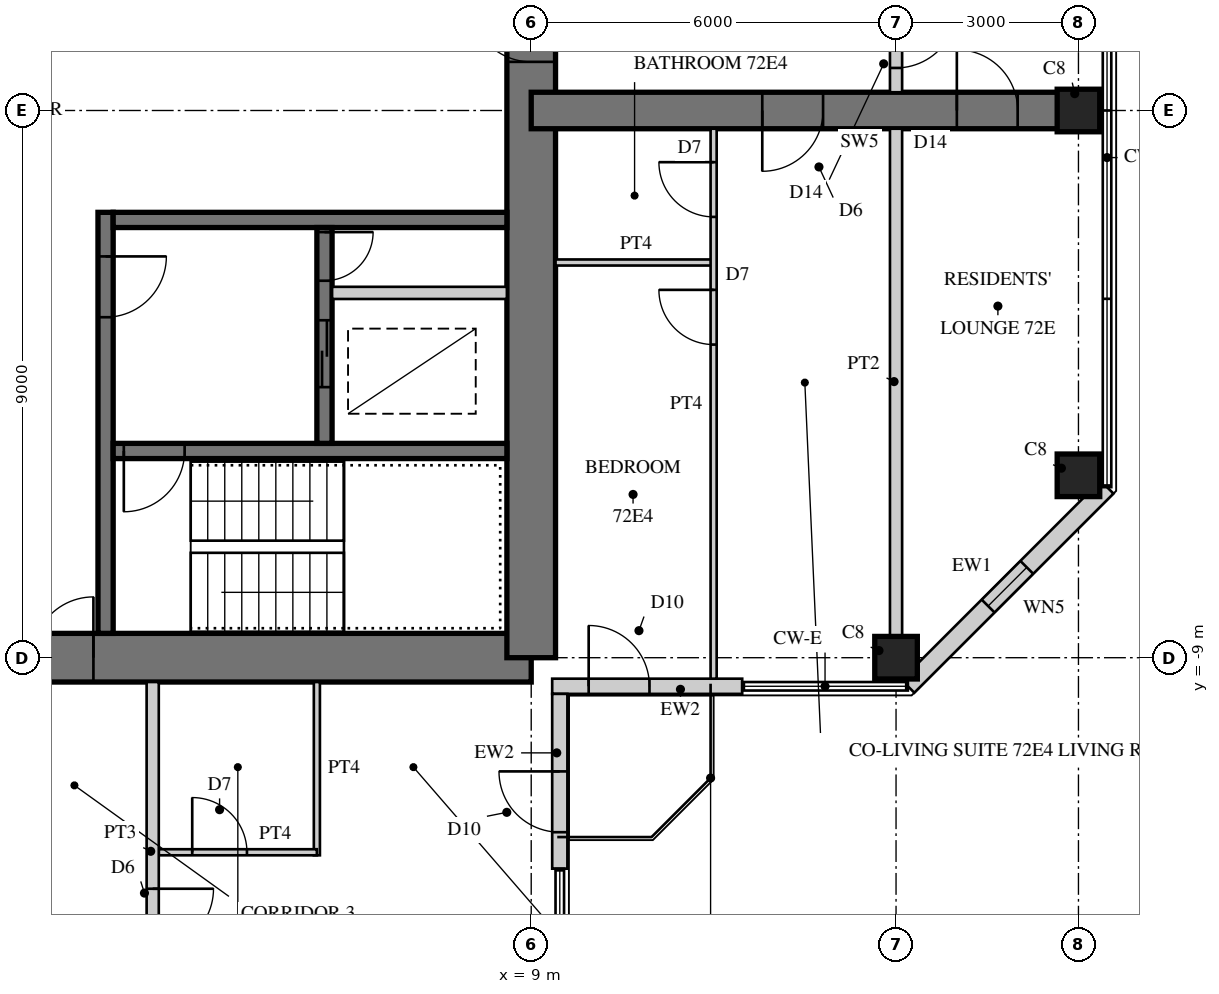
"""IFC4 building model, lengths in metres.
Left out: names, types, materials, properties, quantities, classifications, styles, units other than length and angle.
Written with IfcOpenShell. Run it as: python <this file> out.ifc"""

import sys

from ifc_helpers import new_model, si_unit, direction, frame, frame_2d, origin, origin_2d, place, context, subcontext, project, spatial, rectangle, hollow_rectangle, extrude, element, fill, save


model = new_model("IFC4")
c1 = context("Model", 3, precision=1e-05, world=origin(), true_north=direction((0.0, 1.0)))
c2 = subcontext(c1, "Body", "Model", "MODEL_VIEW")
j1 = project(units=[si_unit("LENGTHUNIT", "METRE"), si_unit("PLANEANGLEUNIT", "RADIAN")], contexts=[c1])
p1 = place(None, origin())
s1 = spatial("IfcSite", under=j1, at=p1, CompositionType="ELEMENT")
p2 = place(p1, origin())
s2 = spatial("IfcBuilding", under=s1, at=p2, CompositionType="ELEMENT")
p3 = place(p2, frame((0.0, 0.0, 278.1)))
s3 = spatial("IfcBuildingStorey", under=s2, at=p3, CompositionType="ELEMENT", Elevation=278.1)
p4 = place(p3, frame((-9.0, -9.0, 0.0), z_axis=(0.0, 0.0, 1.0), x_axis=(1.0, 0.0, 0.0)))
e1 = element("IfcWall", 1, at=p4, inside=s3, PredefinedType="SHEAR", context=c2, shape_type="SweptSolid", body=[
    extrude(rectangle(XDim=18.0, YDim=0.8, at=frame_2d((9.0, 0.0))), origin(), (0.0, 0.0, 1.0), 3.4),
])
p5 = place(p4, frame((9.8, 0.0, 0.0)))
e2 = element("IfcOpeningElement", 2, at=p5, cuts=e1, PredefinedType="OPENING", context=c2, shape_type="SweptSolid", body=[
    extrude(rectangle(XDim=1.0, YDim=2.4, at=frame_2d((0.5, 1.2))), frame((0.0, 0.41, 0.0), z_axis=(0.0, -1.0, 0.0), x_axis=(1.0, 0.0, 0.0)), (0.0, 0.0, 1.0), 0.82),
])
p6 = place(p3, frame((9.0, -9.0, 0.0), z_axis=(0.0, 0.0, 1.0), x_axis=(0.0, 1.0, 0.0)))
e3 = element("IfcWall", 3, at=p6, inside=s3, PredefinedType="SHEAR", context=c2, shape_type="SweptSolid", body=[
    extrude(rectangle(XDim=18.0, YDim=0.8, at=frame_2d((9.0, 0.0))), origin(), (0.0, 0.0, 1.0), 3.4),
])
p7 = place(p6, frame((9.8, 0.0, 0.0)))
e4 = element("IfcOpeningElement", 4, at=p7, cuts=e3, PredefinedType="OPENING", context=c2, shape_type="SweptSolid", body=[
    extrude(rectangle(XDim=1.0, YDim=2.4, at=frame_2d((0.5, 1.2))), frame((0.0, 0.41, 0.0), z_axis=(0.0, -1.0, 0.0), x_axis=(1.0, 0.0, 0.0)), (0.0, 0.0, 1.0), 0.82),
])
p8 = place(p3, frame((2.0, -1.675, 0.0), z_axis=(0.0, 0.0, 1.0), x_axis=(0.0, -1.0, 0.0)))
e5 = element("IfcWall", 5, at=p8, inside=s3, PredefinedType="SHEAR", context=c2, shape_type="SweptSolid", body=[
    extrude(rectangle(XDim=6.925, YDim=0.25, at=frame_2d((3.462, 0.0))), origin(), (0.0, 0.0, 1.0), 3.4),
])
p9 = place(p8, frame((0.725, 0.0, 0.0)))
e6 = element("IfcOpeningElement", 6, at=p9, cuts=e5, PredefinedType="OPENING", context=c2, shape_type="SweptSolid", body=[
    extrude(rectangle(XDim=1.0, YDim=2.1, at=frame_2d((0.5, 1.05))), frame((0.0, 0.135, 0.0), z_axis=(0.0, -1.0, 0.0), x_axis=(1.0, 0.0, 0.0)), (0.0, 0.0, 1.0), 0.27),
])
p10 = place(p3, frame((2.125, -1.8, 0.0), z_axis=(0.0, 0.0, 1.0), x_axis=(1.0, 0.0, 0.0)))
e7 = element("IfcWall", 7, at=p10, inside=s3, PredefinedType="SHEAR", context=c2, shape_type="SweptSolid", body=[
    extrude(rectangle(XDim=6.475, YDim=0.25, at=frame_2d((3.238, 0.0))), origin(), (0.0, 0.0, 1.0), 3.4),
])
p11 = place(p3, frame((2.125, -5.6, 0.0), z_axis=(0.0, 0.0, 1.0), x_axis=(1.0, 0.0, 0.0)))
e8 = element("IfcWall", 8, at=p11, inside=s3, PredefinedType="SHEAR", context=c2, shape_type="SweptSolid", body=[
    extrude(rectangle(XDim=6.475, YDim=0.25, at=frame_2d((3.238, 0.0))), origin(), (0.0, 0.0, 1.0), 3.4),
])
p12 = place(p11, frame((0.175, 0.0, 0.0)))
e9 = element("IfcOpeningElement", 9, at=p12, cuts=e8, PredefinedType="OPENING", context=c2, shape_type="SweptSolid", body=[
    extrude(rectangle(XDim=1.0, YDim=2.1, at=frame_2d((0.5, 1.05))), frame((0.0, 0.135, 0.0), z_axis=(0.0, -1.0, 0.0), x_axis=(1.0, 0.0, 0.0)), (0.0, 0.0, 1.0), 0.27),
])
p13 = place(p3, frame((5.6, -1.925, 0.0), z_axis=(0.0, 0.0, 1.0), x_axis=(0.0, -1.0, 0.0)))
e10 = element("IfcWall", 10, at=p13, inside=s3, PredefinedType="SHEAR", context=c2, shape_type="SweptSolid", body=[
    extrude(rectangle(XDim=3.55, YDim=0.25, at=frame_2d((1.775, 0.0))), origin(), (0.0, 0.0, 1.0), 3.4),
])
p14 = place(p13, frame((1.525, 0.0, 0.0)))
e11 = element("IfcOpeningElement", 11, at=p14, cuts=e10, PredefinedType="OPENING", context=c2, shape_type="SweptSolid", body=[
    extrude(rectangle(XDim=1.1, YDim=2.2, at=frame_2d((0.55, 1.1))), frame((0.0, 0.135, 0.0), z_axis=(0.0, -1.0, 0.0), x_axis=(1.0, 0.0, 0.0)), (0.0, 0.0, 1.0), 0.27),
])
p15 = place(p13, frame((0.075, 0.0, 0.0)))
e12 = element("IfcOpeningElement", 12, at=p15, cuts=e10, PredefinedType="OPENING", context=c2, shape_type="SweptSolid", body=[
    extrude(rectangle(XDim=0.8, YDim=2.1, at=frame_2d((0.4, 1.05))), frame((0.0, 0.135, 0.0), z_axis=(0.0, -1.0, 0.0), x_axis=(1.0, 0.0, 0.0)), (0.0, 0.0, 1.0), 0.27),
])
p16 = place(p3, frame((5.725, -3.0, 0.0), z_axis=(0.0, 0.0, 1.0), x_axis=(1.0, 0.0, 0.0)))
e13 = element("IfcWall", 13, at=p16, inside=s3, PredefinedType="PARTITIONING", context=c2, shape_type="SweptSolid", body=[
    extrude(rectangle(XDim=2.875, YDim=0.2, at=frame_2d((1.438, 0.0))), origin(), (0.0, 0.0, 1.0), 3.4),
])
p17 = place(p3, frame((9.0, 0.0, 0.0), z_axis=(0.0, 0.0, 1.0), x_axis=(1.0, 0.0, 0.0)))
e14 = element("IfcWall", 14, at=p17, inside=s3, PredefinedType="SHEAR", context=c2, shape_type="SweptSolid", body=[
    extrude(rectangle(XDim=9.0, YDim=0.6, at=frame_2d((4.5, 0.0))), origin(), (0.0, 0.0, 1.0), 3.4),
])
p18 = place(p17, frame((3.8, 0.0, 0.0)))
e15 = element("IfcOpeningElement", 15, at=p18, cuts=e14, PredefinedType="OPENING", context=c2, shape_type="SweptSolid", body=[
    extrude(rectangle(XDim=1.0, YDim=2.15, at=frame_2d((0.5, 1.075))), frame((0.0, 0.31, 0.0), z_axis=(0.0, -1.0, 0.0), x_axis=(1.0, 0.0, 0.0)), (0.0, 0.0, 1.0), 0.62),
])
p19 = place(p17, frame((7.0, 0.0, 0.0)))
e16 = element("IfcOpeningElement", 16, at=p19, cuts=e14, PredefinedType="OPENING", context=c2, shape_type="SweptSolid", body=[
    extrude(rectangle(XDim=1.0, YDim=2.2, at=frame_2d((0.5, 1.1))), frame((0.0, 0.31, 0.0), z_axis=(0.0, -1.0, 0.0), x_axis=(1.0, 0.0, 0.0)), (0.0, 0.0, 1.0), 0.62),
])
for number, where, z_axis, x_axis in (
    (17, (15.0, -9.0, 0.0), (0.0, 0.0, 1.0), (1.0, 0.0, 0.0)),
    (18, (18.0, -6.0, 0.0), (0.0, 0.0, 1.0), (1.0, 0.0, 0.0)),
    (19, (18.0, 0.0, 0.0), (0.0, 0.0, 1.0), (1.0, 0.0, 0.0)),
):
    element("IfcColumn", number, at=place(p3, frame(where, z_axis=z_axis, x_axis=x_axis)), inside=s3, PredefinedType="COLUMN", context=c2, shape_type="SweptSolid", body=[
        extrude(rectangle(XDim=0.7, YDim=0.7, at=origin_2d()), origin(), (0.0, 0.0, 1.0), 3.4),
    ])
p20 = place(p3, frame((9.345, -9.47, 0.0), z_axis=(0.0, 0.0, 1.0), x_axis=(1.0, 0.0, 0.0)))
e20 = element("IfcWall", 20, at=p20, inside=s3, PredefinedType="SOLIDWALL", context=c2, shape_type="SweptSolid", body=[
    extrude(rectangle(XDim=3.125, YDim=0.25, at=frame_2d((1.562, 0.0))), origin(), (0.0, 0.0, 1.0), 3.22),
])
p21 = place(p20, frame((0.6, 0.0, 0.0)))
e21 = element("IfcOpeningElement", 21, at=p21, cuts=e20, PredefinedType="OPENING", context=c2, shape_type="SweptSolid", body=[
    extrude(rectangle(XDim=1.0, YDim=2.2, at=frame_2d((0.5, 1.1))), frame((0.0, 0.135, 0.0), z_axis=(0.0, -1.0, 0.0), x_axis=(1.0, 0.0, 0.0)), (0.0, 0.0, 1.0), 0.27),
])
p22 = place(p3, frame((15.195, -9.47, 0.0), z_axis=(0.0, 0.0, 1.0), x_axis=(0.707106781187, 0.707106781187, 0.0)))
e22 = element("IfcWall", 22, at=p22, inside=s3, PredefinedType="SOLIDWALL", context=c2, shape_type="SweptSolid", body=[
    extrude(rectangle(XDim=4.632, YDim=0.3, at=frame_2d((2.316, 0.0))), origin(), (0.0, 0.0, 1.0), 3.22),
])
p23 = place(p22, frame((1.866, 0.0, 0.3)))
e23 = element("IfcOpeningElement", 23, at=p23, cuts=e22, PredefinedType="OPENING", context=c2, shape_type="SweptSolid", body=[
    extrude(rectangle(XDim=0.9, YDim=2.4, at=frame_2d((0.45, 1.2))), frame((0.0, 0.16, 0.0), z_axis=(0.0, -1.0, 0.0), x_axis=(1.0, 0.0, 0.0)), (0.0, 0.0, 1.0), 0.32),
])
p24 = place(p3, frame((9.47, -12.47, 0.0), z_axis=(0.0, 0.0, 1.0), x_axis=(0.0, 1.0, 0.0)))
e24 = element("IfcWall", 24, at=p24, inside=s3, PredefinedType="SOLIDWALL", context=c2, shape_type="SweptSolid", body=[
    extrude(rectangle(XDim=2.875, YDim=0.25, at=frame_2d((1.438, 0.0))), origin(), (0.0, 0.0, 1.0), 3.22),
])
p25 = place(p24, frame((0.6, 0.0, 0.0)))
e25 = element("IfcOpeningElement", 25, at=p25, cuts=e24, PredefinedType="OPENING", context=c2, shape_type="SweptSolid", body=[
    extrude(rectangle(XDim=1.0, YDim=2.2, at=frame_2d((0.5, 1.1))), frame((0.0, 0.135, 0.0), z_axis=(0.0, -1.0, 0.0), x_axis=(1.0, 0.0, 0.0)), (0.0, 0.0, 1.0), 0.27),
])
p26 = place(p3, frame((9.4, -2.5, 0.0), z_axis=(0.0, 0.0, 1.0), x_axis=(1.0, 0.0, 0.0)))
e26 = element("IfcWall", 26, at=p26, inside=s3, PredefinedType="PARTITIONING", context=c2, shape_type="SweptSolid", body=[
    extrude(rectangle(XDim=2.65, YDim=0.1, at=frame_2d((1.325, 0.0))), origin(), (0.0, 0.0, 1.0), 3.22),
])
p27 = place(p3, frame((12.0, -9.345, 0.0), z_axis=(0.0, 0.0, 1.0), x_axis=(0.0, 1.0, 0.0)))
e27 = element("IfcWall", 27, at=p27, inside=s3, PredefinedType="PARTITIONING", context=c2, shape_type="SweptSolid", body=[
    extrude(rectangle(XDim=9.045, YDim=0.1, at=frame_2d((4.522, 0.0))), origin(), (0.0, 0.0, 1.0), 3.22),
])
p28 = place(p27, frame((5.495, 0.0, 0.0)))
e28 = element("IfcOpeningElement", 28, at=p28, cuts=e27, PredefinedType="OPENING", context=c2, shape_type="SweptSolid", body=[
    extrude(rectangle(XDim=0.9, YDim=2.1, at=frame_2d((0.45, 1.05))), frame((0.0, 0.06, 0.0), z_axis=(0.0, -1.0, 0.0), x_axis=(1.0, 0.0, 0.0)), (0.0, 0.0, 1.0), 0.12),
])
p29 = place(p27, frame((7.595, 0.0, 0.0)))
e29 = element("IfcOpeningElement", 29, at=p29, cuts=e27, PredefinedType="OPENING", context=c2, shape_type="SweptSolid", body=[
    extrude(rectangle(XDim=0.9, YDim=2.1, at=frame_2d((0.45, 1.05))), frame((0.0, 0.06, 0.0), z_axis=(0.0, -1.0, 0.0), x_axis=(1.0, 0.0, 0.0)), (0.0, 0.0, 1.0), 0.12),
])
p30 = place(p3, frame((15.0, -8.65, 0.0), z_axis=(0.0, 0.0, 1.0), x_axis=(0.0, 1.0, 0.0)))
e30 = element("IfcWall", 30, at=p30, inside=s3, PredefinedType="SOLIDWALL", context=c2, shape_type="SweptSolid", body=[
    extrude(rectangle(XDim=8.35, YDim=0.2, at=frame_2d((4.175, 0.0))), origin(), (0.0, 0.0, 1.0), 2.52),
])
p31 = place(p3, frame((15.0, 0.3, 0.0), z_axis=(0.0, 0.0, 1.0), x_axis=(0.0, 1.0, 0.0)))
e31 = element("IfcWall", 31, at=p31, inside=s3, PredefinedType="SOLIDWALL", context=c2, shape_type="SweptSolid", body=[
    extrude(rectangle(XDim=8.35, YDim=0.2, at=frame_2d((4.175, 0.0))), origin(), (0.0, 0.0, 1.0), 2.52),
])
p32 = place(p31, frame((0.4, 0.0, 0.0)))
e32 = element("IfcOpeningElement", 32, at=p32, cuts=e31, PredefinedType="OPENING", context=c2, shape_type="SweptSolid", body=[
    extrude(rectangle(XDim=1.0, YDim=2.2, at=frame_2d((0.5, 1.1))), frame((0.0, 0.11, 0.0), z_axis=(0.0, -1.0, 0.0), x_axis=(1.0, 0.0, 0.0)), (0.0, 0.0, 1.0), 0.22),
])
p33 = place(p3, frame((5.475, -9.4, 0.0), z_axis=(0.0, 0.0, 1.0), x_axis=(0.0, -1.0, 0.0)))
e33 = element("IfcWall", 33, at=p33, inside=s3, PredefinedType="PARTITIONING", context=c2, shape_type="SweptSolid", body=[
    extrude(rectangle(XDim=2.85, YDim=0.1, at=frame_2d((1.425, 0.0))), origin(), (0.0, 0.0, 1.0), 3.22),
])
p34 = place(p3, frame((2.875, -12.2, 0.0), z_axis=(0.0, 0.0, 1.0), x_axis=(1.0, 0.0, 0.0)))
e34 = element("IfcWall", 34, at=p34, inside=s3, PredefinedType="PARTITIONING", context=c2, shape_type="SweptSolid", body=[
    extrude(rectangle(XDim=2.6, YDim=0.1, at=frame_2d((1.3, 0.0))), origin(), (0.0, 0.0, 1.0), 3.22),
])
p35 = place(p34, frame((0.55, 0.0, 0.0)))
e35 = element("IfcOpeningElement", 35, at=p35, cuts=e34, PredefinedType="OPENING", context=c2, shape_type="SweptSolid", body=[
    extrude(rectangle(XDim=0.9, YDim=2.1, at=frame_2d((0.45, 1.05))), frame((0.0, 0.06, 0.0), z_axis=(0.0, -1.0, 0.0), x_axis=(1.0, 0.0, 0.0)), (0.0, 0.0, 1.0), 0.12),
])
p36 = place(p3, frame((2.775, -9.4, 0.0), z_axis=(0.0, 0.0, 1.0), x_axis=(0.0, -1.0, 0.0)))
e36 = element("IfcWall", 36, at=p36, inside=s3, PredefinedType="SOLIDWALL", context=c2, shape_type="SweptSolid", body=[
    extrude(rectangle(XDim=5.6, YDim=0.2, at=frame_2d((2.8, 0.0))), origin(), (0.0, 0.0, 1.0), 3.22),
])
p37 = place(p36, frame((3.4, 0.0, 0.0)))
e37 = element("IfcOpeningElement", 37, at=p37, cuts=e36, PredefinedType="OPENING", context=c2, shape_type="SweptSolid", body=[
    extrude(rectangle(XDim=1.0, YDim=2.15, at=frame_2d((0.5, 1.075))), frame((0.0, 0.11, 0.0), z_axis=(0.0, -1.0, 0.0), x_axis=(1.0, 0.0, 0.0)), (0.0, 0.0, 1.0), 0.22),
])
p38 = place(p21, origin())
e38 = element("IfcDoor", 38, at=p38, inside=s3, OperationType="SINGLE_SWING_LEFT", PredefinedType="DOOR", context=c2, shape_type="SweptSolid", body=[
    extrude(hollow_rectangle(XDim=1.0, YDim=2.2, WallThickness=0.06, at=frame_2d((0.5, 1.1))), frame((0.0, 0.025, 0.0), z_axis=(0.0, -1.0, 0.0), x_axis=(1.0, 0.0, 0.0)), (0.0, 0.0, 1.0), 0.05),
    extrude(rectangle(XDim=0.879, YDim=2.079, at=frame_2d((0.5, 1.1))), frame((0.0, 0.025, 0.0), z_axis=(0.0, -1.0, 0.0), x_axis=(1.0, 0.0, 0.0)), (0.0, 0.0, 1.0), 0.05),
])
fill(e21, e38)
p39 = place(p23, origin())
e39 = element("IfcWindow", 39, at=p39, inside=s3, PartitioningType="SINGLE_PANEL", PredefinedType="WINDOW", context=c2, shape_type="SweptSolid", body=[
    extrude(hollow_rectangle(XDim=0.9, YDim=2.4, WallThickness=0.06, at=frame_2d((0.45, 1.2))), frame((0.0, 0.03, 0.0), z_axis=(0.0, -1.0, 0.0), x_axis=(1.0, 0.0, 0.0)), (0.0, 0.0, 1.0), 0.06),
    extrude(rectangle(XDim=0.779, YDim=2.279, at=frame_2d((0.45, 1.2))), frame((0.0, 0.03, 0.0), z_axis=(0.0, -1.0, 0.0), x_axis=(1.0, 0.0, 0.0)), (0.0, 0.0, 1.0), 0.06),
])
fill(e23, e39)
p40 = place(p25, origin())
e40 = element("IfcDoor", 40, at=p40, inside=s3, OperationType="SINGLE_SWING_RIGHT", PredefinedType="DOOR", context=c2, shape_type="SweptSolid", body=[
    extrude(hollow_rectangle(XDim=1.0, YDim=2.2, WallThickness=0.06, at=frame_2d((0.5, 1.1))), frame((0.0, 0.025, 0.0), z_axis=(0.0, -1.0, 0.0), x_axis=(1.0, 0.0, 0.0)), (0.0, 0.0, 1.0), 0.05),
    extrude(rectangle(XDim=0.879, YDim=2.079, at=frame_2d((0.5, 1.1))), frame((0.0, 0.025, 0.0), z_axis=(0.0, -1.0, 0.0), x_axis=(1.0, 0.0, 0.0)), (0.0, 0.0, 1.0), 0.05),
])
fill(e25, e40)
p41 = place(p28, origin())
e41 = element("IfcDoor", 41, at=p41, inside=s3, OperationType="SINGLE_SWING_RIGHT", PredefinedType="DOOR", context=c2, shape_type="SweptSolid", body=[
    extrude(rectangle(XDim=0.9, YDim=2.1, at=frame_2d((0.45, 1.05))), frame((0.0, 0.025, 0.0), z_axis=(0.0, -1.0, 0.0), x_axis=(1.0, 0.0, 0.0)), (0.0, 0.0, 1.0), 0.05),
])
fill(e28, e41)
p42 = place(p29, origin())
e42 = element("IfcDoor", 42, at=p42, inside=s3, OperationType="SINGLE_SWING_RIGHT", PredefinedType="DOOR", context=c2, shape_type="SweptSolid", body=[
    extrude(rectangle(XDim=0.9, YDim=2.1, at=frame_2d((0.45, 1.05))), frame((0.0, 0.025, 0.0), z_axis=(0.0, -1.0, 0.0), x_axis=(1.0, 0.0, 0.0)), (0.0, 0.0, 1.0), 0.05),
])
fill(e29, e42)
p43 = place(p32, frame((1.0, 0.0, 0.0), z_axis=(0.0, 0.0, 1.0), x_axis=(-1.0, 0.0, 0.0)))
e43 = element("IfcDoor", 43, at=p43, inside=s3, OperationType="SINGLE_SWING_LEFT", PredefinedType="DOOR", context=c2, shape_type="SweptSolid", body=[
    extrude(rectangle(XDim=1.0, YDim=2.2, at=frame_2d((0.5, 1.1))), frame((0.0, 0.025, 0.0), z_axis=(0.0, -1.0, 0.0), x_axis=(1.0, 0.0, 0.0)), (0.0, 0.0, 1.0), 0.05),
])
fill(e32, e43)
p44 = place(p35, origin())
e44 = element("IfcDoor", 44, at=p44, inside=s3, OperationType="SINGLE_SWING_LEFT", PredefinedType="DOOR", context=c2, shape_type="SweptSolid", body=[
    extrude(rectangle(XDim=0.9, YDim=2.1, at=frame_2d((0.45, 1.05))), frame((0.0, 0.025, 0.0), z_axis=(0.0, -1.0, 0.0), x_axis=(1.0, 0.0, 0.0)), (0.0, 0.0, 1.0), 0.05),
])
fill(e35, e44)
p45 = place(p37, origin())
e45 = element("IfcDoor", 45, at=p45, inside=s3, OperationType="SINGLE_SWING_LEFT", PredefinedType="DOOR", context=c2, shape_type="SweptSolid", body=[
    extrude(rectangle(XDim=1.0, YDim=2.15, at=frame_2d((0.5, 1.075))), frame((0.0, 0.025, 0.0), z_axis=(0.0, -1.0, 0.0), x_axis=(1.0, 0.0, 0.0)), (0.0, 0.0, 1.0), 0.05),
])
fill(e37, e45)
p46 = place(p18, frame((1.0, 0.0, 0.0), z_axis=(0.0, 0.0, 1.0), x_axis=(-1.0, 0.0, 0.0)))
e46 = element("IfcDoor", 46, at=p46, inside=s3, OperationType="SINGLE_SWING_RIGHT", PredefinedType="DOOR", context=c2, shape_type="SweptSolid", body=[
    extrude(rectangle(XDim=1.0, YDim=2.15, at=frame_2d((0.5, 1.075))), frame((0.0, 0.025, 0.0), z_axis=(0.0, -1.0, 0.0), x_axis=(1.0, 0.0, 0.0)), (0.0, 0.0, 1.0), 0.05),
])
fill(e15, e46)
p47 = place(p19, origin())
e47 = element("IfcDoor", 47, at=p47, inside=s3, OperationType="SINGLE_SWING_LEFT", PredefinedType="DOOR", context=c2, shape_type="SweptSolid", body=[
    extrude(rectangle(XDim=1.0, YDim=2.2, at=frame_2d((0.5, 1.1))), frame((0.0, 0.025, 0.0), z_axis=(0.0, -1.0, 0.0), x_axis=(1.0, 0.0, 0.0)), (0.0, 0.0, 1.0), 0.05),
])
fill(e16, e47)
p48 = place(p5, origin())
e48 = element("IfcDoor", 48, at=p48, inside=s3, OperationType="SINGLE_SWING_RIGHT", PredefinedType="DOOR", context=c2, shape_type="SweptSolid", body=[
    extrude(rectangle(XDim=1.0, YDim=2.4, at=frame_2d((0.5, 1.2))), frame((0.0, 0.055, 0.0), z_axis=(0.0, -1.0, 0.0), x_axis=(1.0, 0.0, 0.0)), (0.0, 0.0, 1.0), 0.05),
])
fill(e2, e48)
p49 = place(p7, origin())
e49 = element("IfcDoor", 49, at=p49, inside=s3, OperationType="SINGLE_SWING_RIGHT", PredefinedType="DOOR", context=c2, shape_type="SweptSolid", body=[
    extrude(rectangle(XDim=1.0, YDim=2.4, at=frame_2d((0.5, 1.2))), frame((0.0, 0.055, 0.0), z_axis=(0.0, -1.0, 0.0), x_axis=(1.0, 0.0, 0.0)), (0.0, 0.0, 1.0), 0.05),
])
fill(e4, e49)
p50 = place(p9, origin())
e50 = element("IfcDoor", 50, at=p50, inside=s3, OperationType="SINGLE_SWING_LEFT", PredefinedType="DOOR", context=c2, shape_type="SweptSolid", body=[
    extrude(rectangle(XDim=1.0, YDim=2.1, at=frame_2d((0.5, 1.05))), frame((0.0, 0.025, 0.0), z_axis=(0.0, -1.0, 0.0), x_axis=(1.0, 0.0, 0.0)), (0.0, 0.0, 1.0), 0.05),
])
fill(e6, e50)
p51 = place(p12, frame((1.0, 0.0, 0.0), z_axis=(0.0, 0.0, 1.0), x_axis=(-1.0, 0.0, 0.0)))
e51 = element("IfcDoor", 51, at=p51, inside=s3, OperationType="SINGLE_SWING_RIGHT", PredefinedType="DOOR", context=c2, shape_type="SweptSolid", body=[
    extrude(rectangle(XDim=1.0, YDim=2.1, at=frame_2d((0.5, 1.05))), frame((0.0, 0.025, 0.0), z_axis=(0.0, -1.0, 0.0), x_axis=(1.0, 0.0, 0.0)), (0.0, 0.0, 1.0), 0.05),
])
fill(e9, e51)
p52 = place(p14, origin())
e52 = element("IfcDoor", 52, at=p52, inside=s3, OperationType="DOUBLE_DOOR_SLIDING", PredefinedType="DOOR", context=c2, shape_type="SweptSolid", body=[
    extrude(rectangle(XDim=1.1, YDim=2.2, at=frame_2d((0.55, 1.1))), frame((0.0, 0.025, 0.0), z_axis=(0.0, -1.0, 0.0), x_axis=(1.0, 0.0, 0.0)), (0.0, 0.0, 1.0), 0.05),
])
fill(e11, e52)
p53 = place(p15, origin())
e53 = element("IfcDoor", 53, at=p53, inside=s3, OperationType="SINGLE_SWING_LEFT", PredefinedType="DOOR", context=c2, shape_type="SweptSolid", body=[
    extrude(rectangle(XDim=0.8, YDim=2.1, at=frame_2d((0.4, 1.05))), frame((0.0, 0.025, 0.0), z_axis=(0.0, -1.0, 0.0), x_axis=(1.0, 0.0, 0.0)), (0.0, 0.0, 1.0), 0.05),
])
fill(e12, e53)
save(model, sys.argv[1])
